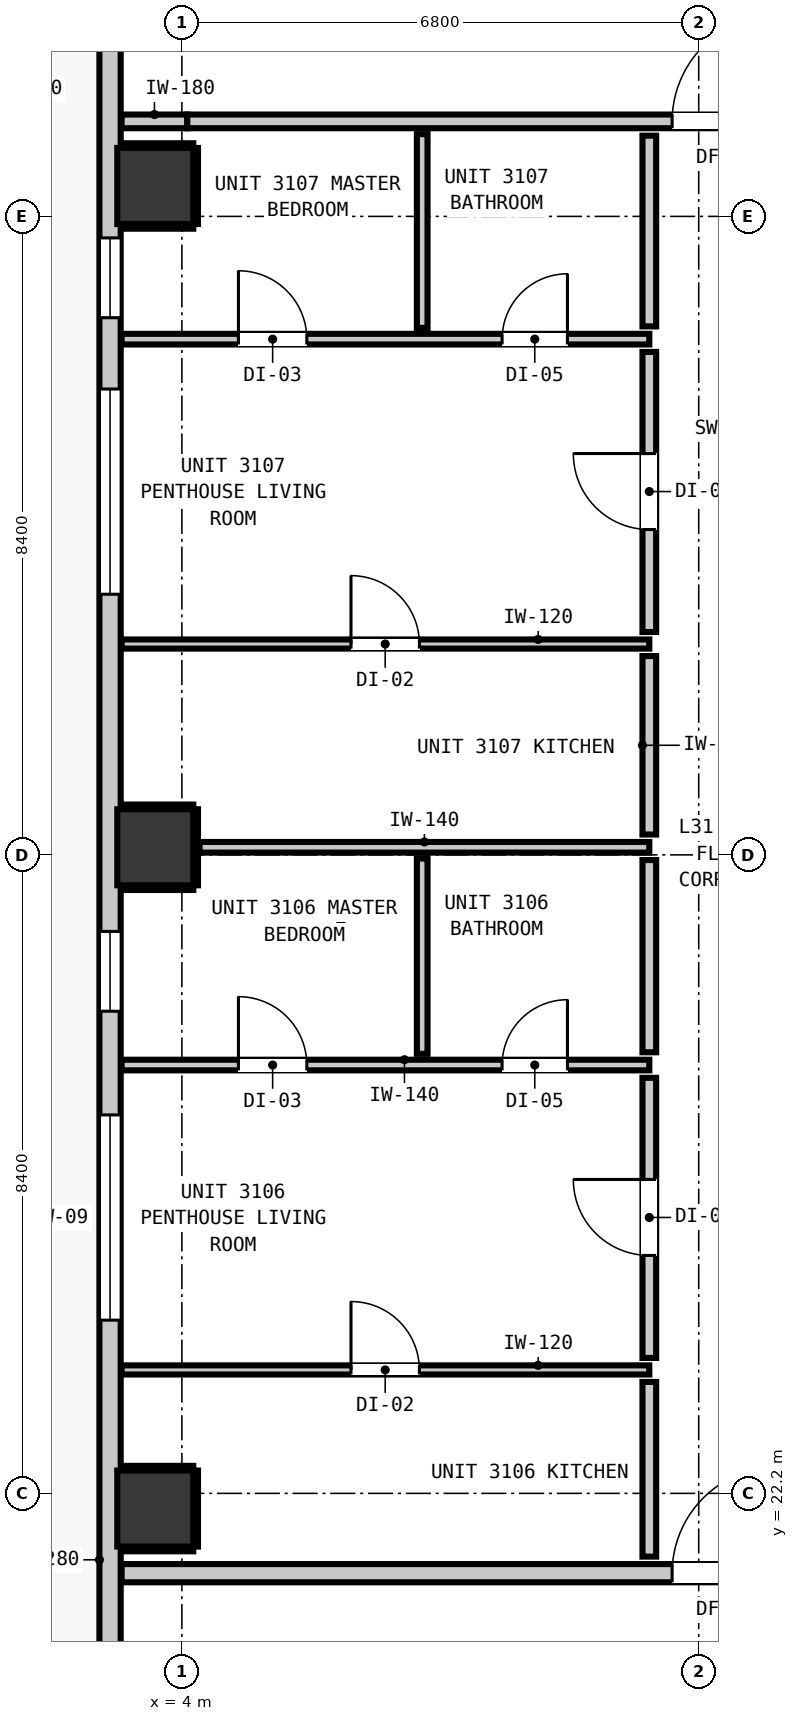
"""IFC4 building model, lengths in metres.
Left out: names, types, materials, properties, quantities, classifications, styles, units other than length and angle.
Written with IfcOpenShell. Run it as: python <this file> out.ifc"""

import sys

from ifc_helpers import new_model, si_unit, direction, frame, frame_2d, origin, origin_2d, place, context, subcontext, project, spatial, rectangle, extrude, element, fill, save


model = new_model("IFC4")
c1 = context("Model", 3, precision=1e-05, world=origin(), true_north=direction((0.0, 1.0)))
c2 = subcontext(c1, "Body", "Model", "MODEL_VIEW")
j1 = project(units=[si_unit("LENGTHUNIT", "METRE"), si_unit("PLANEANGLEUNIT", "RADIAN")], contexts=[c1])
p1 = place(None, origin())
s1 = spatial("IfcSite", under=j1, at=p1, CompositionType="ELEMENT")
p2 = place(p1, origin())
s2 = spatial("IfcBuilding", under=s1, at=p2, CompositionType="ELEMENT")
p3 = place(p2, frame((0.0, 0.0, 109.4)))
s3 = spatial("IfcBuildingStorey", under=s2, at=p3, CompositionType="ELEMENT", Elevation=109.4)
for number, where, z_axis, x_axis in (
    (1, (3.65, 22.0, 0.0), (0.0, 0.0, 1.0), (1.0, 0.0, 0.0)),
    (2, (3.65, 30.7, 0.0), (0.0, 0.0, 1.0), (1.0, 0.0, 0.0)),
    (3, (3.65, 39.4, 0.0), (0.0, 0.0, 1.0), (1.0, 0.0, 0.0)),
):
    element("IfcColumn", number, at=place(p3, frame(where, z_axis=z_axis, x_axis=x_axis)), inside=s3, PredefinedType="COLUMN", context=c2, shape_type="SweptSolid", body=[
        extrude(rectangle(XDim=1.0, YDim=1.0, at=origin_2d()), origin(), (0.0, 0.0, 1.0), 3.32),
    ])
p4 = place(p3, frame((3.055, 11.355, 0.0), z_axis=(0.0, 0.0, 1.0), x_axis=(0.0, 1.0, 0.0)))
e4 = element("IfcWall", 4, at=p4, inside=s3, PredefinedType="STANDARD", context=c2, shape_type="SweptSolid", body=[
    extrude(rectangle(XDim=32.29, YDim=0.28, at=frame_2d((16.145, 0.0))), origin(), (0.0, 0.0, 1.0), 3.08),
])
p5 = place(p4, frame((5.818, 0.0, 0.0)))
e5 = element("IfcOpeningElement", 5, at=p5, cuts=e4, PredefinedType="OPENING", context=c2, shape_type="SweptSolid", body=[
    extrude(rectangle(XDim=1.0, YDim=2.15, at=frame_2d((0.5, 1.075))), frame((0.0, 0.15, 0.0), z_axis=(0.0, -1.0, 0.0), x_axis=(1.0, 0.0, 0.0)), (0.0, 0.0, 1.0), 0.3),
])
p6 = place(p4, frame((0.545, 0.0, 0.85)))
e6 = element("IfcOpeningElement", 6, at=p6, cuts=e4, PredefinedType="OPENING", context=c2, shape_type="SweptSolid", body=[
    extrude(rectangle(XDim=1.05, YDim=1.65, at=frame_2d((0.525, 0.825))), frame((0.0, 0.15, 0.0), z_axis=(0.0, -1.0, 0.0), x_axis=(1.0, 0.0, 0.0)), (0.0, 0.0, 1.0), 0.3),
])
p7 = place(p4, frame((13.124, 0.0, 0.85)))
e7 = element("IfcOpeningElement", 7, at=p7, cuts=e4, PredefinedType="OPENING", context=c2, shape_type="SweptSolid", body=[
    extrude(rectangle(XDim=2.7, YDim=2.0, at=frame_2d((1.35, 1.0))), frame((0.0, 0.15, 0.0), z_axis=(0.0, -1.0, 0.0), x_axis=(1.0, 0.0, 0.0)), (0.0, 0.0, 1.0), 0.3),
])
p8 = place(p4, frame((17.188, 0.0, 0.85)))
e8 = element("IfcOpeningElement", 8, at=p8, cuts=e4, PredefinedType="OPENING", context=c2, shape_type="SweptSolid", body=[
    extrude(rectangle(XDim=1.05, YDim=1.65, at=frame_2d((0.525, 0.825))), frame((0.0, 0.15, 0.0), z_axis=(0.0, -1.0, 0.0), x_axis=(1.0, 0.0, 0.0)), (0.0, 0.0, 1.0), 0.3),
])
p9 = place(p4, frame((22.674, 0.0, 0.85)))
e9 = element("IfcOpeningElement", 9, at=p9, cuts=e4, PredefinedType="OPENING", context=c2, shape_type="SweptSolid", body=[
    extrude(rectangle(XDim=2.7, YDim=2.0, at=frame_2d((1.35, 1.0))), frame((0.0, 0.15, 0.0), z_axis=(0.0, -1.0, 0.0), x_axis=(1.0, 0.0, 0.0)), (0.0, 0.0, 1.0), 0.3),
])
p10 = place(p4, frame((26.312, 0.0, 0.85)))
e10 = element("IfcOpeningElement", 10, at=p10, cuts=e4, PredefinedType="OPENING", context=c2, shape_type="SweptSolid", body=[
    extrude(rectangle(XDim=1.05, YDim=1.65, at=frame_2d((0.525, 0.825))), frame((0.0, 0.15, 0.0), z_axis=(0.0, -1.0, 0.0), x_axis=(1.0, 0.0, 0.0)), (0.0, 0.0, 1.0), 0.3),
])
p11 = place(p3, frame((3.207, 21.15, 0.0), z_axis=(0.0, 0.0, 1.0), x_axis=(1.0, 0.0, 0.0)))
e11 = element("IfcWall", 11, at=p11, inside=s3, PredefinedType="PARTITIONING", context=c2, shape_type="SweptSolid", body=[
    extrude(rectangle(XDim=39.386, YDim=0.24, at=frame_2d((19.693, 0.0))), origin(), (0.0, 0.0, 1.0), 3.08),
])
p12 = place(p11, frame((15.003, 0.0, 0.0)))
e12 = element("IfcOpeningElement", 12, at=p12, cuts=e11, PredefinedType="OPENING", context=c2, shape_type="SweptSolid", body=[
    extrude(rectangle(XDim=1.1, YDim=2.15, at=frame_2d((0.55, 1.075))), frame((0.0, 0.13, 0.0), z_axis=(0.0, -1.0, 0.0), x_axis=(1.0, 0.0, 0.0)), (0.0, 0.0, 1.0), 0.26),
])
p13 = place(p11, frame((7.243, 0.0, 0.0)))
e13 = element("IfcOpeningElement", 13, at=p13, cuts=e11, PredefinedType="OPENING", context=c2, shape_type="SweptSolid", body=[
    extrude(rectangle(XDim=1.4, YDim=2.15, at=frame_2d((0.7, 1.075))), frame((0.0, 0.13, 0.0), z_axis=(0.0, -1.0, 0.0), x_axis=(1.0, 0.0, 0.0)), (0.0, 0.0, 1.0), 0.26),
])
p14 = place(p11, frame((34.843, 0.0, 0.0)))
e14 = element("IfcOpeningElement", 14, at=p14, cuts=e11, PredefinedType="OPENING", context=c2, shape_type="SweptSolid", body=[
    extrude(rectangle(XDim=1.4, YDim=2.15, at=frame_2d((0.7, 1.075))), frame((0.0, 0.13, 0.0), z_axis=(0.0, -1.0, 0.0), x_axis=(1.0, 0.0, 0.0)), (0.0, 0.0, 1.0), 0.26),
])
p15 = place(p3, frame((3.207, 40.25, 0.0), z_axis=(0.0, 0.0, 1.0), x_axis=(1.0, 0.0, 0.0)))
e15 = element("IfcWall", 15, at=p15, inside=s3, PredefinedType="PARTITIONING", context=c2, shape_type="SweptSolid", body=[
    extrude(rectangle(XDim=0.864, YDim=0.18, at=frame_2d((0.432, 0.0))), origin(), (0.0, 0.0, 1.0), 3.08),
])
p16 = place(p3, frame((4.071, 40.25, 0.0), z_axis=(0.0, 0.0, 1.0), x_axis=(1.0, 0.0, 0.0)))
e16 = element("IfcWall", 16, at=p16, inside=s3, PredefinedType="PARTITIONING", context=c2, shape_type="SweptSolid", body=[
    extrude(rectangle(XDim=8.908, YDim=0.18, at=frame_2d((4.454, 0.0))), origin(), (0.0, 0.0, 1.0), 2.565),
])
p17 = place(p16, frame((6.379, 0.0, 0.0)))
e17 = element("IfcOpeningElement", 17, at=p17, cuts=e16, PredefinedType="OPENING", context=c2, shape_type="SweptSolid", body=[
    extrude(rectangle(XDim=1.4, YDim=2.15, at=frame_2d((0.7, 1.075))), frame((0.0, 0.1, 0.0), z_axis=(0.0, -1.0, 0.0), x_axis=(1.0, 0.0, 0.0)), (0.0, 0.0, 1.0), 0.2),
])
p18 = place(p3, frame((3.207, 27.835, 0.0), z_axis=(0.0, 0.0, 1.0), x_axis=(1.0, 0.0, 0.0)))
e18 = element("IfcWall", 18, at=p18, inside=s3, PredefinedType="PARTITIONING", context=c2, shape_type="SweptSolid", body=[
    extrude(rectangle(XDim=6.943, YDim=0.14, at=frame_2d((3.471, 0.0))), origin(), (0.0, 0.0, 1.0), 3.08),
])
p19 = place(p18, frame((5.006, 0.0, 0.0)))
e19 = element("IfcOpeningElement", 19, at=p19, cuts=e18, PredefinedType="OPENING", context=c2, shape_type="SweptSolid", body=[
    extrude(rectangle(XDim=0.86, YDim=2.02, at=frame_2d((0.43, 1.01))), frame((0.0, 0.08, 0.0), z_axis=(0.0, -1.0, 0.0), x_axis=(1.0, 0.0, 0.0)), (0.0, 0.0, 1.0), 0.16),
])
p20 = place(p18, frame((1.537, 0.0, 0.0)))
e20 = element("IfcOpeningElement", 20, at=p20, cuts=e18, PredefinedType="OPENING", context=c2, shape_type="SweptSolid", body=[
    extrude(rectangle(XDim=0.9, YDim=2.1, at=frame_2d((0.45, 1.05))), frame((0.0, 0.08, 0.0), z_axis=(0.0, -1.0, 0.0), x_axis=(1.0, 0.0, 0.0)), (0.0, 0.0, 1.0), 0.16),
])
p21 = place(p3, frame((4.232, 30.7, 0.0), z_axis=(0.0, 0.0, 1.0), x_axis=(1.0, 0.0, 0.0)))
e21 = element("IfcWall", 21, at=p21, inside=s3, PredefinedType="PARTITIONING", context=c2, shape_type="SweptSolid", body=[
    extrude(rectangle(XDim=5.918, YDim=0.14, at=frame_2d((2.959, 0.0))), origin(), (0.0, 0.0, 1.0), 2.315),
])
p22 = place(p3, frame((3.207, 37.385, 0.0), z_axis=(0.0, 0.0, 1.0), x_axis=(1.0, 0.0, 0.0)))
e22 = element("IfcWall", 22, at=p22, inside=s3, PredefinedType="PARTITIONING", context=c2, shape_type="SweptSolid", body=[
    extrude(rectangle(XDim=6.943, YDim=0.14, at=frame_2d((3.471, 0.0))), origin(), (0.0, 0.0, 1.0), 3.08),
])
p23 = place(p22, frame((5.006, 0.0, 0.0)))
e23 = element("IfcOpeningElement", 23, at=p23, cuts=e22, PredefinedType="OPENING", context=c2, shape_type="SweptSolid", body=[
    extrude(rectangle(XDim=0.86, YDim=2.02, at=frame_2d((0.43, 1.01))), frame((0.0, 0.08, 0.0), z_axis=(0.0, -1.0, 0.0), x_axis=(1.0, 0.0, 0.0)), (0.0, 0.0, 1.0), 0.16),
])
p24 = place(p22, frame((1.537, 0.0, 0.0)))
e24 = element("IfcOpeningElement", 24, at=p24, cuts=e22, PredefinedType="OPENING", context=c2, shape_type="SweptSolid", body=[
    extrude(rectangle(XDim=0.9, YDim=2.1, at=frame_2d((0.45, 1.05))), frame((0.0, 0.08, 0.0), z_axis=(0.0, -1.0, 0.0), x_axis=(1.0, 0.0, 0.0)), (0.0, 0.0, 1.0), 0.16),
])
p25 = place(p3, frame((3.207, 23.824, 0.0), z_axis=(0.0, 0.0, 1.0), x_axis=(1.0, 0.0, 0.0)))
e25 = element("IfcWall", 25, at=p25, inside=s3, PredefinedType="PARTITIONING", context=c2, shape_type="SweptSolid", body=[
    extrude(rectangle(XDim=6.943, YDim=0.12, at=frame_2d((3.471, 0.0))), origin(), (0.0, 0.0, 1.0), 3.08),
])
p26 = place(p25, frame((3.018, 0.0, 0.0)))
e26 = element("IfcOpeningElement", 26, at=p26, cuts=e25, PredefinedType="OPENING", context=c2, shape_type="SweptSolid", body=[
    extrude(rectangle(XDim=0.9, YDim=2.1, at=frame_2d((0.45, 1.05))), frame((0.0, 0.07, 0.0), z_axis=(0.0, -1.0, 0.0), x_axis=(1.0, 0.0, 0.0)), (0.0, 0.0, 1.0), 0.14),
])
p27 = place(p3, frame((3.207, 33.374, 0.0), z_axis=(0.0, 0.0, 1.0), x_axis=(1.0, 0.0, 0.0)))
e27 = element("IfcWall", 27, at=p27, inside=s3, PredefinedType="PARTITIONING", context=c2, shape_type="SweptSolid", body=[
    extrude(rectangle(XDim=6.943, YDim=0.12, at=frame_2d((3.471, 0.0))), origin(), (0.0, 0.0, 1.0), 3.08),
])
p28 = place(p27, frame((3.018, 0.0, 0.0)))
e28 = element("IfcOpeningElement", 28, at=p28, cuts=e27, PredefinedType="OPENING", context=c2, shape_type="SweptSolid", body=[
    extrude(rectangle(XDim=0.9, YDim=2.1, at=frame_2d((0.45, 1.05))), frame((0.0, 0.07, 0.0), z_axis=(0.0, -1.0, 0.0), x_axis=(1.0, 0.0, 0.0)), (0.0, 0.0, 1.0), 0.14),
])
p29 = place(p3, frame((10.15, 21.368, 0.0), z_axis=(0.0, 0.0, 1.0), x_axis=(0.0, 1.0, 0.0)))
e29 = element("IfcWall", 29, at=p29, inside=s3, PredefinedType="PARTITIONING", context=c2, shape_type="SweptSolid", body=[
    extrude(rectangle(XDim=2.298, YDim=0.18, at=frame_2d((1.149, 0.0))), origin(), (0.0, 0.0, 1.0), 3.08),
])
p30 = place(p3, frame((10.15, 23.982, 0.0), z_axis=(0.0, 0.0, 1.0), x_axis=(0.0, 1.0, 0.0)))
e30 = element("IfcWall", 30, at=p30, inside=s3, PredefinedType="PARTITIONING", context=c2, shape_type="SweptSolid", body=[
    extrude(rectangle(XDim=3.685, YDim=0.18, at=frame_2d((1.843, 0.0))), origin(), (0.0, 0.0, 1.0), 3.08),
])
p31 = place(p30, frame((1.348, 0.0, 0.0)))
e31 = element("IfcOpeningElement", 31, at=p31, cuts=e30, PredefinedType="OPENING", context=c2, shape_type="SweptSolid", body=[
    extrude(rectangle(XDim=1.0, YDim=2.15, at=frame_2d((0.5, 1.075))), frame((0.0, 0.1, 0.0), z_axis=(0.0, -1.0, 0.0), x_axis=(1.0, 0.0, 0.0)), (0.0, 0.0, 1.0), 0.2),
])
p32 = place(p3, frame((10.15, 28.003, 0.0), z_axis=(0.0, 0.0, 1.0), x_axis=(0.0, 1.0, 0.0)))
e32 = element("IfcWall", 32, at=p32, inside=s3, PredefinedType="PARTITIONING", context=c2, shape_type="SweptSolid", body=[
    extrude(rectangle(XDim=2.529, YDim=0.18, at=frame_2d((1.265, 0.0))), origin(), (0.0, 0.0, 1.0), 3.08),
])
p33 = place(p3, frame((10.15, 30.868, 0.0), z_axis=(0.0, 0.0, 1.0), x_axis=(0.0, 1.0, 0.0)))
e33 = element("IfcWall", 33, at=p33, inside=s3, PredefinedType="PARTITIONING", context=c2, shape_type="SweptSolid", body=[
    extrude(rectangle(XDim=2.348, YDim=0.18, at=frame_2d((1.174, 0.0))), origin(), (0.0, 0.0, 1.0), 3.08),
])
p34 = place(p3, frame((10.15, 33.532, 0.0), z_axis=(0.0, 0.0, 1.0), x_axis=(0.0, 1.0, 0.0)))
e34 = element("IfcWall", 34, at=p34, inside=s3, PredefinedType="PARTITIONING", context=c2, shape_type="SweptSolid", body=[
    extrude(rectangle(XDim=3.685, YDim=0.18, at=frame_2d((1.843, 0.0))), origin(), (0.0, 0.0, 1.0), 3.08),
])
p35 = place(p34, frame((1.348, 0.0, 0.0)))
e35 = element("IfcOpeningElement", 35, at=p35, cuts=e34, PredefinedType="OPENING", context=c2, shape_type="SweptSolid", body=[
    extrude(rectangle(XDim=1.0, YDim=2.15, at=frame_2d((0.5, 1.075))), frame((0.0, 0.1, 0.0), z_axis=(0.0, -1.0, 0.0), x_axis=(1.0, 0.0, 0.0)), (0.0, 0.0, 1.0), 0.2),
])
p36 = place(p3, frame((10.15, 37.553, 0.0), z_axis=(0.0, 0.0, 1.0), x_axis=(0.0, 1.0, 0.0)))
e36 = element("IfcWall", 36, at=p36, inside=s3, PredefinedType="PARTITIONING", context=c2, shape_type="SweptSolid", body=[
    extrude(rectangle(XDim=2.509, YDim=0.18, at=frame_2d((1.254, 0.0))), origin(), (0.0, 0.0, 1.0), 3.08),
])
p37 = place(p3, frame((7.162, 27.983, 0.0), z_axis=(0.0, 0.0, 1.0), x_axis=(0.0, 1.0, 0.0)))
e37 = element("IfcWall", 37, at=p37, inside=s3, PredefinedType="PARTITIONING", context=c2, shape_type="SweptSolid", body=[
    extrude(rectangle(XDim=2.569, YDim=0.14, at=frame_2d((1.285, 0.0))), origin(), (0.0, 0.0, 1.0), 3.08),
])
p38 = place(p3, frame((7.162, 37.533, 0.0), z_axis=(0.0, 0.0, 1.0), x_axis=(0.0, 1.0, 0.0)))
e38 = element("IfcWall", 38, at=p38, inside=s3, PredefinedType="PARTITIONING", context=c2, shape_type="SweptSolid", body=[
    extrude(rectangle(XDim=2.549, YDim=0.14, at=frame_2d((1.274, 0.0))), origin(), (0.0, 0.0, 1.0), 3.08),
])
for number, where, z_axis, x_axis in (
    (39, (3.21, 21.468, 0.0), (0.0, 0.0, 1.0), (1.0, 0.0, 0.0)),
    (40, (3.21, 22.532, 0.0), (0.0, 0.0, 1.0), (1.0, 0.0, 0.0)),
):
    element("IfcWall", number, at=place(p3, frame(where, z_axis=z_axis, x_axis=x_axis)), inside=s3, PredefinedType="PARTITIONING", context=c2, shape_type="SweptSolid", body=[
        extrude(rectangle(XDim=0.94, YDim=0.06, at=frame_2d((0.47, 0.0))), origin(), (0.0, 0.0, 1.0), 1.45),
    ])
p39 = place(p3, frame((4.182, 21.5, 0.0), z_axis=(0.0, 0.0, 1.0), x_axis=(0.0, 1.0, 0.0)))
e41 = element("IfcWall", 41, at=p39, inside=s3, PredefinedType="PARTITIONING", context=c2, shape_type="SweptSolid", body=[
    extrude(rectangle(XDim=1.0, YDim=0.06, at=frame_2d((0.5, 0.0))), origin(), (0.0, 0.0, 1.0), 1.45),
])
for number, where, z_axis, x_axis in (
    (42, (3.21, 30.168, 0.0), (0.0, 0.0, 1.0), (1.0, 0.0, 0.0)),
    (43, (3.21, 31.232, 0.0), (0.0, 0.0, 1.0), (1.0, 0.0, 0.0)),
):
    element("IfcWall", number, at=place(p3, frame(where, z_axis=z_axis, x_axis=x_axis)), inside=s3, PredefinedType="PARTITIONING", context=c2, shape_type="SweptSolid", body=[
        extrude(rectangle(XDim=0.94, YDim=0.06, at=frame_2d((0.47, 0.0))), origin(), (0.0, 0.0, 1.0), 1.45),
    ])
p40 = place(p3, frame((4.182, 30.2, 0.0), z_axis=(0.0, 0.0, 1.0), x_axis=(0.0, 1.0, 0.0)))
e44 = element("IfcWall", 44, at=p40, inside=s3, PredefinedType="PARTITIONING", context=c2, shape_type="SweptSolid", body=[
    extrude(rectangle(XDim=1.0, YDim=0.06, at=frame_2d((0.5, 0.0))), origin(), (0.0, 0.0, 1.0), 1.45),
])
for number, where, z_axis, x_axis in (
    (45, (3.21, 38.868, 0.0), (0.0, 0.0, 1.0), (1.0, 0.0, 0.0)),
    (46, (3.21, 39.932, 0.0), (0.0, 0.0, 1.0), (1.0, 0.0, 0.0)),
):
    element("IfcWall", number, at=place(p3, frame(where, z_axis=z_axis, x_axis=x_axis)), inside=s3, PredefinedType="PARTITIONING", context=c2, shape_type="SweptSolid", body=[
        extrude(rectangle(XDim=0.94, YDim=0.06, at=frame_2d((0.47, 0.0))), origin(), (0.0, 0.0, 1.0), 1.45),
    ])
p41 = place(p3, frame((4.182, 38.9, 0.0), z_axis=(0.0, 0.0, 1.0), x_axis=(0.0, 1.0, 0.0)))
e47 = element("IfcWall", 47, at=p41, inside=s3, PredefinedType="PARTITIONING", context=c2, shape_type="SweptSolid", body=[
    extrude(rectangle(XDim=1.0, YDim=0.06, at=frame_2d((0.5, 0.0))), origin(), (0.0, 0.0, 1.0), 1.45),
])
p42 = place(p7, origin())
e48 = element("IfcWindow", 48, at=p42, inside=s3, PartitioningType="SINGLE_PANEL", PredefinedType="WINDOW", context=c2, shape_type="SweptSolid", body=[
    extrude(rectangle(XDim=2.7, YDim=2.0, at=frame_2d((1.35, 1.0))), frame((0.0, 0.03, 0.0), z_axis=(0.0, -1.0, 0.0), x_axis=(1.0, 0.0, 0.0)), (0.0, 0.0, 1.0), 0.06),
])
fill(e7, e48)
p43 = place(p8, origin())
e49 = element("IfcWindow", 49, at=p43, inside=s3, PartitioningType="SINGLE_PANEL", PredefinedType="WINDOW", context=c2, shape_type="SweptSolid", body=[
    extrude(rectangle(XDim=1.05, YDim=1.65, at=frame_2d((0.525, 0.825))), frame((0.0, 0.03, 0.0), z_axis=(0.0, -1.0, 0.0), x_axis=(1.0, 0.0, 0.0)), (0.0, 0.0, 1.0), 0.06),
])
fill(e8, e49)
p44 = place(p9, origin())
e50 = element("IfcWindow", 50, at=p44, inside=s3, PartitioningType="SINGLE_PANEL", PredefinedType="WINDOW", context=c2, shape_type="SweptSolid", body=[
    extrude(rectangle(XDim=2.7, YDim=2.0, at=frame_2d((1.35, 1.0))), frame((0.0, 0.03, 0.0), z_axis=(0.0, -1.0, 0.0), x_axis=(1.0, 0.0, 0.0)), (0.0, 0.0, 1.0), 0.06),
])
fill(e9, e50)
p45 = place(p10, origin())
e51 = element("IfcWindow", 51, at=p45, inside=s3, PartitioningType="SINGLE_PANEL", PredefinedType="WINDOW", context=c2, shape_type="SweptSolid", body=[
    extrude(rectangle(XDim=1.05, YDim=1.65, at=frame_2d((0.525, 0.825))), frame((0.0, 0.03, 0.0), z_axis=(0.0, -1.0, 0.0), x_axis=(1.0, 0.0, 0.0)), (0.0, 0.0, 1.0), 0.06),
])
fill(e10, e51)
p46 = place(p13, origin())
e52 = element("IfcDoor", 52, at=p46, inside=s3, OperationType="SINGLE_SWING_RIGHT", PredefinedType="DOOR", context=c2, shape_type="SweptSolid", body=[
    extrude(rectangle(XDim=1.4, YDim=2.15, at=frame_2d((0.7, 1.075))), frame((0.0, 0.025, 0.0), z_axis=(0.0, -1.0, 0.0), x_axis=(1.0, 0.0, 0.0)), (0.0, 0.0, 1.0), 0.05),
])
fill(e13, e52)
p47 = place(p17, origin())
e53 = element("IfcDoor", 53, at=p47, inside=s3, OperationType="SINGLE_SWING_RIGHT", PredefinedType="DOOR", context=c2, shape_type="SweptSolid", body=[
    extrude(rectangle(XDim=1.4, YDim=2.15, at=frame_2d((0.7, 1.075))), frame((0.0, 0.025, 0.0), z_axis=(0.0, -1.0, 0.0), x_axis=(1.0, 0.0, 0.0)), (0.0, 0.0, 1.0), 0.05),
])
fill(e17, e53)
p48 = place(p31, origin())
e54 = element("IfcDoor", 54, at=p48, inside=s3, OperationType="SINGLE_SWING_RIGHT", PredefinedType="DOOR", context=c2, shape_type="SweptSolid", body=[
    extrude(rectangle(XDim=1.0, YDim=2.15, at=frame_2d((0.5, 1.075))), frame((0.0, 0.025, 0.0), z_axis=(0.0, -1.0, 0.0), x_axis=(1.0, 0.0, 0.0)), (0.0, 0.0, 1.0), 0.05),
])
fill(e31, e54)
p49 = place(p26, origin())
e55 = element("IfcDoor", 55, at=p49, inside=s3, OperationType="SINGLE_SWING_LEFT", PredefinedType="DOOR", context=c2, shape_type="SweptSolid", body=[
    extrude(rectangle(XDim=0.9, YDim=2.1, at=frame_2d((0.45, 1.05))), frame((0.0, 0.025, 0.0), z_axis=(0.0, -1.0, 0.0), x_axis=(1.0, 0.0, 0.0)), (0.0, 0.0, 1.0), 0.05),
])
fill(e26, e55)
p50 = place(p19, origin())
e56 = element("IfcDoor", 56, at=p50, inside=s3, OperationType="SINGLE_SWING_RIGHT", PredefinedType="DOOR", context=c2, shape_type="SweptSolid", body=[
    extrude(rectangle(XDim=0.86, YDim=2.02, at=frame_2d((0.43, 1.01))), frame((0.0, 0.025, 0.0), z_axis=(0.0, -1.0, 0.0), x_axis=(1.0, 0.0, 0.0)), (0.0, 0.0, 1.0), 0.05),
])
fill(e19, e56)
p51 = place(p20, origin())
e57 = element("IfcDoor", 57, at=p51, inside=s3, OperationType="SINGLE_SWING_LEFT", PredefinedType="DOOR", context=c2, shape_type="SweptSolid", body=[
    extrude(rectangle(XDim=0.9, YDim=2.1, at=frame_2d((0.45, 1.05))), frame((0.0, 0.025, 0.0), z_axis=(0.0, -1.0, 0.0), x_axis=(1.0, 0.0, 0.0)), (0.0, 0.0, 1.0), 0.05),
])
fill(e20, e57)
p52 = place(p35, origin())
e58 = element("IfcDoor", 58, at=p52, inside=s3, OperationType="SINGLE_SWING_RIGHT", PredefinedType="DOOR", context=c2, shape_type="SweptSolid", body=[
    extrude(rectangle(XDim=1.0, YDim=2.15, at=frame_2d((0.5, 1.075))), frame((0.0, 0.025, 0.0), z_axis=(0.0, -1.0, 0.0), x_axis=(1.0, 0.0, 0.0)), (0.0, 0.0, 1.0), 0.05),
])
fill(e35, e58)
p53 = place(p28, origin())
e59 = element("IfcDoor", 59, at=p53, inside=s3, OperationType="SINGLE_SWING_LEFT", PredefinedType="DOOR", context=c2, shape_type="SweptSolid", body=[
    extrude(rectangle(XDim=0.9, YDim=2.1, at=frame_2d((0.45, 1.05))), frame((0.0, 0.025, 0.0), z_axis=(0.0, -1.0, 0.0), x_axis=(1.0, 0.0, 0.0)), (0.0, 0.0, 1.0), 0.05),
])
fill(e28, e59)
p54 = place(p23, origin())
e60 = element("IfcDoor", 60, at=p54, inside=s3, OperationType="SINGLE_SWING_RIGHT", PredefinedType="DOOR", context=c2, shape_type="SweptSolid", body=[
    extrude(rectangle(XDim=0.86, YDim=2.02, at=frame_2d((0.43, 1.01))), frame((0.0, 0.025, 0.0), z_axis=(0.0, -1.0, 0.0), x_axis=(1.0, 0.0, 0.0)), (0.0, 0.0, 1.0), 0.05),
])
fill(e23, e60)
p55 = place(p24, origin())
e61 = element("IfcDoor", 61, at=p55, inside=s3, OperationType="SINGLE_SWING_LEFT", PredefinedType="DOOR", context=c2, shape_type="SweptSolid", body=[
    extrude(rectangle(XDim=0.9, YDim=2.1, at=frame_2d((0.45, 1.05))), frame((0.0, 0.025, 0.0), z_axis=(0.0, -1.0, 0.0), x_axis=(1.0, 0.0, 0.0)), (0.0, 0.0, 1.0), 0.05),
])
fill(e24, e61)
save(model, sys.argv[1])
